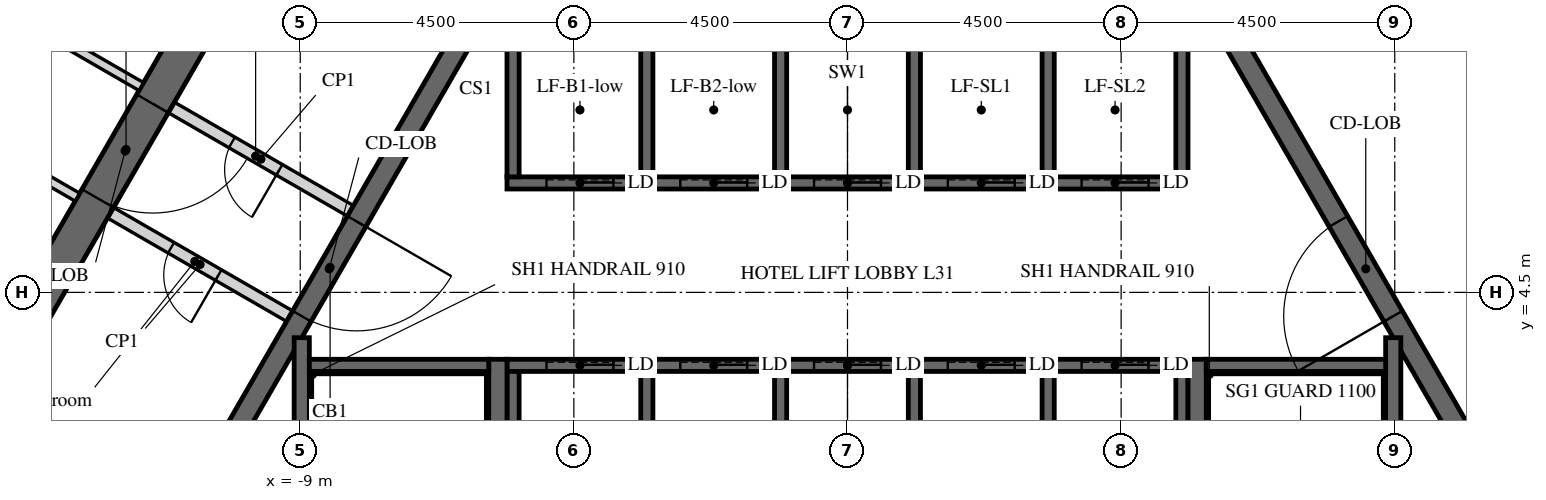
"""IFC4 building model, lengths in metres.
Left out: names, types, materials, properties, quantities, classifications, styles, units other than length and angle.
Written with IfcOpenShell. Run it as: python <this file> out.ifc"""

import sys

from ifc_helpers import new_model, si_unit, direction, frame, frame_2d, origin, place, context, subcontext, project, spatial, polyline, rectangle, outline, extrude, element, fill, save


model = new_model("IFC4")
c1 = context("Model", 3, precision=1e-05, world=origin(), true_north=direction((0.0, 1.0)))
c2 = subcontext(c1, "Body", "Model", "MODEL_VIEW")
j1 = project(units=[si_unit("LENGTHUNIT", "METRE"), si_unit("PLANEANGLEUNIT", "RADIAN")], contexts=[c1])
p1 = place(None, origin())
s1 = spatial("IfcSite", under=j1, at=p1, CompositionType="ELEMENT")
p2 = place(p1, origin())
s2 = spatial("IfcBuilding", under=s1, at=p2, CompositionType="ELEMENT")
p3 = place(p2, frame((0.0, 0.0, 135.0)))
s3 = spatial("IfcBuildingStorey", under=s2, at=p3, CompositionType="ELEMENT", Elevation=135.0)
p4 = place(p3, frame((-7.91, 13.7, -0.15), z_axis=(0.0, 0.0, 1.0), x_axis=(-0.499999880136, -0.866025472988, 0.0)))
e1 = element("IfcWall", 1, at=p4, inside=s3, PredefinedType="SHEAR", context=c2, shape_type="SweptSolid", body=[
    extrude(outline(polyline([(-0.173, -0.3), (15.993, -0.3), (15.646, 0.3), (0.173, 0.3), (-0.173, -0.3)])), origin(), (0.0, 0.0, 1.0), 3.9),
])
p5 = place(p4, frame((7.039, 0.0, 0.15)))
e2 = element("IfcOpeningElement", 2, at=p5, cuts=e1, PredefinedType="OPENING", context=c2, shape_type="SweptSolid", body=[
    extrude(rectangle(XDim=1.8, YDim=2.4, at=frame_2d((0.9, 1.2))), frame((0.0, 0.31, 0.0), z_axis=(0.0, -1.0, 0.0), x_axis=(1.0, 0.0, 0.0)), (0.0, 0.0, 1.0), 0.62),
])
p6 = place(p3, frame((15.819, 0.0, -0.15), z_axis=(0.0, 0.0, 1.0), x_axis=(-0.499999880136, 0.866025472988, 0.0)))
e3 = element("IfcWall", 3, at=p6, inside=s3, PredefinedType="SHEAR", context=c2, shape_type="SweptSolid", body=[
    extrude(outline(polyline([(-0.173, -0.3), (15.993, -0.3), (15.646, 0.3), (0.173, 0.3), (-0.173, -0.3)])), origin(), (0.0, 0.0, 1.0), 3.9),
])
p7 = place(p6, frame((6.981, 0.0, 0.15)))
e4 = element("IfcOpeningElement", 4, at=p7, cuts=e3, PredefinedType="OPENING", context=c2, shape_type="SweptSolid", body=[
    extrude(rectangle(XDim=1.8, YDim=2.4, at=frame_2d((0.9, 1.2))), frame((0.0, 0.31, 0.0), z_axis=(0.0, -1.0, 0.0), x_axis=(1.0, 0.0, 0.0)), (0.0, 0.0, 1.0), 0.62),
])
p8 = place(p3, frame((-5.673, 9.825, -0.15), z_axis=(0.0, 0.0, 1.0), x_axis=(-0.499995046907, -0.866028263435, 0.0)))
e5 = element("IfcWall", 5, at=p8, inside=s3, PredefinedType="SHEAR", context=c2, shape_type="SweptSolid", body=[
    extrude(outline(polyline([(-0.101, -0.175), (11.446, -0.175), (11.244, 0.175), (0.101, 0.175), (-0.101, -0.175)])), origin(), (0.0, 0.0, 1.0), 3.9),
])
p9 = place(p8, frame((4.801, 0.0, 0.15)))
e6 = element("IfcOpeningElement", 6, at=p9, cuts=e5, PredefinedType="OPENING", context=c2, shape_type="SweptSolid", body=[
    extrude(rectangle(XDim=1.8, YDim=2.4, at=frame_2d((0.9, 1.2))), frame((0.0, 0.185, 0.0), z_axis=(0.0, -1.0, 0.0), x_axis=(1.0, 0.0, 0.0)), (0.0, 0.0, 1.0), 0.37),
])
p10 = place(p3, frame((11.345, 0.0, -0.15), z_axis=(0.0, 0.0, 1.0), x_axis=(-0.499995046907, 0.866028263435, 0.0)))
e7 = element("IfcWall", 7, at=p10, inside=s3, PredefinedType="SHEAR", context=c2, shape_type="SweptSolid", body=[
    extrude(outline(polyline([(-0.101, -0.175), (11.446, -0.175), (11.244, 0.175), (0.101, 0.175), (-0.101, -0.175)])), origin(), (0.0, 0.0, 1.0), 3.9),
])
p11 = place(p10, frame((4.744, 0.0, 0.15)))
e8 = element("IfcOpeningElement", 8, at=p11, cuts=e7, PredefinedType="OPENING", context=c2, shape_type="SweptSolid", body=[
    extrude(rectangle(XDim=1.8, YDim=2.4, at=frame_2d((0.9, 1.2))), frame((0.0, 0.185, 0.0), z_axis=(0.0, -1.0, 0.0), x_axis=(1.0, 0.0, 0.0)), (0.0, 0.0, 1.0), 0.37),
])
p12 = place(p3, frame((-5.6, 6.3, -0.25), z_axis=(0.0, 0.0, 1.0), x_axis=(1.0, 0.0, 0.0)))
e9 = element("IfcWall", 9, at=p12, inside=s3, PredefinedType="SHEAR", context=c2, shape_type="SweptSolid", body=[
    extrude(rectangle(XDim=11.2, YDim=0.2, at=frame_2d((5.6, 0.0))), origin(), (0.0, 0.0, 1.0), 3.9),
])
p13 = place(p12, frame((0.65, 0.0, 0.25)))
e10 = element("IfcOpeningElement", 10, at=p13, cuts=e9, PredefinedType="OPENING", context=c2, shape_type="SweptSolid", body=[
    extrude(rectangle(XDim=1.1, YDim=2.1, at=frame_2d((0.55, 1.05))), frame((0.0, 0.11, 0.0), z_axis=(0.0, -1.0, 0.0), x_axis=(1.0, 0.0, 0.0)), (0.0, 0.0, 1.0), 0.22),
])
p14 = place(p12, frame((2.85, 0.0, 0.25)))
e11 = element("IfcOpeningElement", 11, at=p14, cuts=e9, PredefinedType="OPENING", context=c2, shape_type="SweptSolid", body=[
    extrude(rectangle(XDim=1.1, YDim=2.1, at=frame_2d((0.55, 1.05))), frame((0.0, 0.11, 0.0), z_axis=(0.0, -1.0, 0.0), x_axis=(1.0, 0.0, 0.0)), (0.0, 0.0, 1.0), 0.22),
])
p15 = place(p12, frame((5.05, 0.0, 0.25)))
e12 = element("IfcOpeningElement", 12, at=p15, cuts=e9, PredefinedType="OPENING", context=c2, shape_type="SweptSolid", body=[
    extrude(rectangle(XDim=1.1, YDim=2.1, at=frame_2d((0.55, 1.05))), frame((0.0, 0.11, 0.0), z_axis=(0.0, -1.0, 0.0), x_axis=(1.0, 0.0, 0.0)), (0.0, 0.0, 1.0), 0.22),
])
p16 = place(p12, frame((7.25, 0.0, 0.25)))
e13 = element("IfcOpeningElement", 13, at=p16, cuts=e9, PredefinedType="OPENING", context=c2, shape_type="SweptSolid", body=[
    extrude(rectangle(XDim=1.1, YDim=2.1, at=frame_2d((0.55, 1.05))), frame((0.0, 0.11, 0.0), z_axis=(0.0, -1.0, 0.0), x_axis=(1.0, 0.0, 0.0)), (0.0, 0.0, 1.0), 0.22),
])
p17 = place(p12, frame((9.45, 0.0, 0.25)))
e14 = element("IfcOpeningElement", 14, at=p17, cuts=e9, PredefinedType="OPENING", context=c2, shape_type="SweptSolid", body=[
    extrude(rectangle(XDim=1.1, YDim=2.1, at=frame_2d((0.55, 1.05))), frame((0.0, 0.11, 0.0), z_axis=(0.0, -1.0, 0.0), x_axis=(1.0, 0.0, 0.0)), (0.0, 0.0, 1.0), 0.22),
])
for number, where, z_axis, x_axis in (
    (15, (-5.5, 6.4, -0.25), (0.0, 0.0, 1.0), (0.0, 1.0, 0.0)),
    (16, (-3.3, 6.4, -0.25), (0.0, 0.0, 1.0), (0.0, 1.0, 0.0)),
    (17, (-1.1, 6.4, -0.25), (0.0, 0.0, 1.0), (0.0, 1.0, 0.0)),
    (18, (1.1, 6.4, -0.25), (0.0, 0.0, 1.0), (0.0, 1.0, 0.0)),
    (19, (3.3, 6.4, -0.25), (0.0, 0.0, 1.0), (0.0, 1.0, 0.0)),
    (20, (5.5, 6.4, -0.25), (0.0, 0.0, 1.0), (0.0, 1.0, 0.0)),
):
    element("IfcWall", number, at=place(p3, frame(where, z_axis=z_axis, x_axis=x_axis)), inside=s3, PredefinedType="SHEAR", context=c2, shape_type="SweptSolid", body=[
        extrude(rectangle(XDim=2.9, YDim=0.2, at=frame_2d((1.45, 0.0))), origin(), (0.0, 0.0, 1.0), 3.9),
    ])
p18 = place(p3, frame((-5.6, 3.3, -0.25), z_axis=(0.0, 0.0, 1.0), x_axis=(1.0, 0.0, 0.0)))
e21 = element("IfcWall", 21, at=p18, inside=s3, PredefinedType="SHEAR", context=c2, shape_type="SweptSolid", body=[
    extrude(rectangle(XDim=11.2, YDim=0.2, at=frame_2d((5.6, 0.0))), origin(), (0.0, 0.0, 1.0), 3.9),
])
p19 = place(p18, frame((0.65, 0.0, 0.25)))
e22 = element("IfcOpeningElement", 22, at=p19, cuts=e21, PredefinedType="OPENING", context=c2, shape_type="SweptSolid", body=[
    extrude(rectangle(XDim=1.1, YDim=2.1, at=frame_2d((0.55, 1.05))), frame((0.0, 0.11, 0.0), z_axis=(0.0, -1.0, 0.0), x_axis=(1.0, 0.0, 0.0)), (0.0, 0.0, 1.0), 0.22),
])
p20 = place(p18, frame((2.85, 0.0, 0.25)))
e23 = element("IfcOpeningElement", 23, at=p20, cuts=e21, PredefinedType="OPENING", context=c2, shape_type="SweptSolid", body=[
    extrude(rectangle(XDim=1.1, YDim=2.1, at=frame_2d((0.55, 1.05))), frame((0.0, 0.11, 0.0), z_axis=(0.0, -1.0, 0.0), x_axis=(1.0, 0.0, 0.0)), (0.0, 0.0, 1.0), 0.22),
])
p21 = place(p18, frame((5.05, 0.0, 0.25)))
e24 = element("IfcOpeningElement", 24, at=p21, cuts=e21, PredefinedType="OPENING", context=c2, shape_type="SweptSolid", body=[
    extrude(rectangle(XDim=1.1, YDim=2.1, at=frame_2d((0.55, 1.05))), frame((0.0, 0.11, 0.0), z_axis=(0.0, -1.0, 0.0), x_axis=(1.0, 0.0, 0.0)), (0.0, 0.0, 1.0), 0.22),
])
p22 = place(p18, frame((7.25, 0.0, 0.25)))
e25 = element("IfcOpeningElement", 25, at=p22, cuts=e21, PredefinedType="OPENING", context=c2, shape_type="SweptSolid", body=[
    extrude(rectangle(XDim=1.1, YDim=2.1, at=frame_2d((0.55, 1.05))), frame((0.0, 0.11, 0.0), z_axis=(0.0, -1.0, 0.0), x_axis=(1.0, 0.0, 0.0)), (0.0, 0.0, 1.0), 0.22),
])
p23 = place(p18, frame((9.45, 0.0, 0.25)))
e26 = element("IfcOpeningElement", 26, at=p23, cuts=e21, PredefinedType="OPENING", context=c2, shape_type="SweptSolid", body=[
    extrude(rectangle(XDim=1.1, YDim=2.1, at=frame_2d((0.55, 1.05))), frame((0.0, 0.11, 0.0), z_axis=(0.0, -1.0, 0.0), x_axis=(1.0, 0.0, 0.0)), (0.0, 0.0, 1.0), 0.22),
])
for number, where, z_axis, x_axis in (
    (27, (-5.5, 0.1, -0.25), (0.0, 0.0, 1.0), (0.0, 1.0, 0.0)),
    (28, (-3.3, 0.1, -0.25), (0.0, 0.0, 1.0), (0.0, 1.0, 0.0)),
    (29, (-1.1, 0.1, -0.25), (0.0, 0.0, 1.0), (0.0, 1.0, 0.0)),
    (30, (1.1, 0.1, -0.25), (0.0, 0.0, 1.0), (0.0, 1.0, 0.0)),
    (31, (3.3, 0.1, -0.25), (0.0, 0.0, 1.0), (0.0, 1.0, 0.0)),
    (32, (5.5, 0.1, -0.25), (0.0, 0.0, 1.0), (0.0, 1.0, 0.0)),
):
    element("IfcWall", number, at=place(p3, frame(where, z_axis=z_axis, x_axis=x_axis)), inside=s3, PredefinedType="SHEAR", context=c2, shape_type="SweptSolid", body=[
        extrude(rectangle(XDim=3.1, YDim=0.2, at=frame_2d((1.55, 0.0))), origin(), (0.0, 0.0, 1.0), 3.9),
    ])
p24 = place(p3, frame((-9.175, 4.109, 0.0), z_axis=(0.0, 0.0, 1.0), x_axis=(-0.865989465428, 0.500062241894, 0.0)))
e33 = element("IfcWall", 33, at=p24, inside=s3, PredefinedType="PARTITIONING", context=c2, shape_type="SweptSolid", body=[
    extrude(rectangle(XDim=3.4, YDim=0.2, at=frame_2d((1.7, 0.0))), origin(), (0.0, 0.0, 1.0), 3.65),
])
p25 = place(p24, frame((1.351, 0.0, 0.0)))
e34 = element("IfcOpeningElement", 34, at=p25, cuts=e33, PredefinedType="OPENING", context=c2, shape_type="SweptSolid", body=[
    extrude(rectangle(XDim=0.9, YDim=2.1, at=frame_2d((0.45, 1.05))), frame((0.0, 0.11, 0.0), z_axis=(0.0, -1.0, 0.0), x_axis=(1.0, 0.0, 0.0)), (0.0, 0.0, 1.0), 0.22),
])
p26 = place(p3, frame((-8.175, 5.841, 0.0), z_axis=(0.0, 0.0, 1.0), x_axis=(-0.866020560687, 0.500008388397, 0.0)))
e35 = element("IfcWall", 35, at=p26, inside=s3, PredefinedType="PARTITIONING", context=c2, shape_type="SweptSolid", body=[
    extrude(rectangle(XDim=3.4, YDim=0.2, at=frame_2d((1.7, 0.0))), origin(), (0.0, 0.0, 1.0), 3.65),
])
p27 = place(p26, frame((1.35, 0.0, 0.0)))
e36 = element("IfcOpeningElement", 36, at=p27, cuts=e35, PredefinedType="OPENING", context=c2, shape_type="SweptSolid", body=[
    extrude(rectangle(XDim=0.9, YDim=2.1, at=frame_2d((0.45, 1.05))), frame((0.0, 0.11, 0.0), z_axis=(0.0, -1.0, 0.0), x_axis=(1.0, 0.0, 0.0)), (0.0, 0.0, 1.0), 0.22),
])
p28 = place(p3, frame((5.75, -3.4, -0.25), z_axis=(0.0, 0.0, 1.0), x_axis=(0.0, 1.0, 0.0)))
e37 = element("IfcWall", 37, at=p28, inside=s3, PredefinedType="SHEAR", context=c2, shape_type="SweptSolid", body=[
    extrude(rectangle(XDim=6.8, YDim=0.3, at=frame_2d((3.4, 0.0))), origin(), (0.0, 0.0, 1.0), 3.9),
])
p29 = place(p3, frame((8.975, -3.755, -0.25), z_axis=(0.0, 0.0, 1.0), x_axis=(0.0, 1.0, 0.0)))
e38 = element("IfcWall", 38, at=p29, inside=s3, PredefinedType="SHEAR", context=c2, shape_type="SweptSolid", body=[
    extrude(rectangle(XDim=7.51, YDim=0.25, at=frame_2d((3.755, 0.0))), origin(), (0.0, 0.0, 1.0), 3.9),
])
p30 = place(p3, frame((5.9, 3.3, -0.25), z_axis=(0.0, 0.0, 1.0), x_axis=(1.0, 0.0, 0.0)))
e39 = element("IfcWall", 39, at=p30, inside=s3, PredefinedType="SHEAR", context=c2, shape_type="SweptSolid", body=[
    extrude(rectangle(XDim=2.95, YDim=0.2, at=frame_2d((1.475, 0.0))), origin(), (0.0, 0.0, 1.0), 3.9),
])
p31 = place(p3, frame((-5.75, -3.4, -0.25), z_axis=(0.0, 0.0, 1.0), x_axis=(0.0, 1.0, 0.0)))
e40 = element("IfcWall", 40, at=p31, inside=s3, PredefinedType="SHEAR", context=c2, shape_type="SweptSolid", body=[
    extrude(rectangle(XDim=6.8, YDim=0.3, at=frame_2d((3.4, 0.0))), origin(), (0.0, 0.0, 1.0), 3.9),
])
p32 = place(p3, frame((-8.975, -3.755, -0.25), z_axis=(0.0, 0.0, 1.0), x_axis=(0.0, 1.0, 0.0)))
e41 = element("IfcWall", 41, at=p32, inside=s3, PredefinedType="SHEAR", context=c2, shape_type="SweptSolid", body=[
    extrude(rectangle(XDim=7.51, YDim=0.25, at=frame_2d((3.755, 0.0))), origin(), (0.0, 0.0, 1.0), 3.9),
])
p33 = place(p3, frame((-8.85, 3.3, -0.25), z_axis=(0.0, 0.0, 1.0), x_axis=(1.0, 0.0, 0.0)))
e42 = element("IfcWall", 42, at=p33, inside=s3, PredefinedType="SHEAR", context=c2, shape_type="SweptSolid", body=[
    extrude(rectangle(XDim=2.95, YDim=0.2, at=frame_2d((1.475, 0.0))), origin(), (0.0, 0.0, 1.0), 3.9),
])
p34 = place(p3, frame((-11.614, 7.884, 0.0), z_axis=(0.0, 0.0, 1.0), x_axis=(-0.866017375886, 0.50001390447, 0.0)))
e43 = element("IfcWall", 43, at=p34, inside=s3, PredefinedType="PARTITIONING", context=c2, shape_type="SweptSolid", body=[
    extrude(rectangle(XDim=5.97, YDim=0.15, at=frame_2d((2.985, 0.0))), origin(), (0.0, 0.0, 1.0), 2.838),
])
p35 = place(p3, frame((-17.642, 8.94, 0.0), z_axis=(0.0, 0.0, 1.0), x_axis=(0.866017948234, -0.500012913169, 0.0)))
e44 = element("IfcWall", 44, at=p35, inside=s3, PredefinedType="PARTITIONING", context=c2, shape_type="SweptSolid", body=[
    extrude(rectangle(XDim=5.748, YDim=0.15, at=frame_2d((2.874, 0.0))), origin(), (0.0, 0.0, 1.0), 2.838),
])
p36 = place(p5, origin())
e45 = element("IfcDoor", 45, at=p36, inside=s3, OperationType="DOUBLE_DOOR_SINGLE_SWING", PredefinedType="DOOR", context=c2, shape_type="SweptSolid", body=[
    extrude(rectangle(XDim=1.8, YDim=2.4, at=frame_2d((0.9, 1.2))), frame((0.0, 0.025, 0.0), z_axis=(0.0, -1.0, 0.0), x_axis=(1.0, 0.0, 0.0)), (0.0, 0.0, 1.0), 0.05),
])
fill(e2, e45)
p37 = place(p9, origin())
e46 = element("IfcDoor", 46, at=p37, inside=s3, OperationType="DOUBLE_DOOR_SINGLE_SWING", PredefinedType="DOOR", context=c2, shape_type="SweptSolid", body=[
    extrude(rectangle(XDim=1.8, YDim=2.4, at=frame_2d((0.9, 1.2))), frame((0.0, 0.025, 0.0), z_axis=(0.0, -1.0, 0.0), x_axis=(1.0, 0.0, 0.0)), (0.0, 0.0, 1.0), 0.05),
])
fill(e6, e46)
p38 = place(p11, origin())
e47 = element("IfcDoor", 47, at=p38, inside=s3, OperationType="DOUBLE_DOOR_SINGLE_SWING", PredefinedType="DOOR", context=c2, shape_type="SweptSolid", body=[
    extrude(rectangle(XDim=1.8, YDim=2.4, at=frame_2d((0.9, 1.2))), frame((0.0, 0.025, 0.0), z_axis=(0.0, -1.0, 0.0), x_axis=(1.0, 0.0, 0.0)), (0.0, 0.0, 1.0), 0.05),
])
fill(e8, e47)
p39 = place(p25, origin())
e48 = element("IfcDoor", 48, at=p39, inside=s3, OperationType="SINGLE_SWING_LEFT", PredefinedType="DOOR", context=c2, shape_type="SweptSolid", body=[
    extrude(rectangle(XDim=0.9, YDim=2.1, at=frame_2d((0.45, 1.05))), frame((0.0, 0.025, 0.0), z_axis=(0.0, -1.0, 0.0), x_axis=(1.0, 0.0, 0.0)), (0.0, 0.0, 1.0), 0.05),
])
fill(e34, e48)
p40 = place(p27, origin())
e49 = element("IfcDoor", 49, at=p40, inside=s3, OperationType="SINGLE_SWING_LEFT", PredefinedType="DOOR", context=c2, shape_type="SweptSolid", body=[
    extrude(rectangle(XDim=0.9, YDim=2.1, at=frame_2d((0.45, 1.05))), frame((0.0, 0.025, 0.0), z_axis=(0.0, -1.0, 0.0), x_axis=(1.0, 0.0, 0.0)), (0.0, 0.0, 1.0), 0.05),
])
fill(e36, e49)
p41 = place(p13, origin())
e50 = element("IfcDoor", 50, at=p41, inside=s3, OperationType="SLIDING_TO_LEFT", PredefinedType="DOOR", context=c2, shape_type="SweptSolid", body=[
    extrude(rectangle(XDim=1.1, YDim=2.1, at=frame_2d((0.55, 1.05))), frame((0.0, 0.025, 0.0), z_axis=(0.0, -1.0, 0.0), x_axis=(1.0, 0.0, 0.0)), (0.0, 0.0, 1.0), 0.05),
])
fill(e10, e50)
p42 = place(p14, origin())
e51 = element("IfcDoor", 51, at=p42, inside=s3, OperationType="SLIDING_TO_LEFT", PredefinedType="DOOR", context=c2, shape_type="SweptSolid", body=[
    extrude(rectangle(XDim=1.1, YDim=2.1, at=frame_2d((0.55, 1.05))), frame((0.0, 0.025, 0.0), z_axis=(0.0, -1.0, 0.0), x_axis=(1.0, 0.0, 0.0)), (0.0, 0.0, 1.0), 0.05),
])
fill(e11, e51)
p43 = place(p15, origin())
e52 = element("IfcDoor", 52, at=p43, inside=s3, OperationType="SLIDING_TO_LEFT", PredefinedType="DOOR", context=c2, shape_type="SweptSolid", body=[
    extrude(rectangle(XDim=1.1, YDim=2.1, at=frame_2d((0.55, 1.05))), frame((0.0, 0.025, 0.0), z_axis=(0.0, -1.0, 0.0), x_axis=(1.0, 0.0, 0.0)), (0.0, 0.0, 1.0), 0.05),
])
fill(e12, e52)
p44 = place(p16, origin())
e53 = element("IfcDoor", 53, at=p44, inside=s3, OperationType="SLIDING_TO_LEFT", PredefinedType="DOOR", context=c2, shape_type="SweptSolid", body=[
    extrude(rectangle(XDim=1.1, YDim=2.1, at=frame_2d((0.55, 1.05))), frame((0.0, 0.025, 0.0), z_axis=(0.0, -1.0, 0.0), x_axis=(1.0, 0.0, 0.0)), (0.0, 0.0, 1.0), 0.05),
])
fill(e13, e53)
p45 = place(p17, origin())
e54 = element("IfcDoor", 54, at=p45, inside=s3, OperationType="SLIDING_TO_LEFT", PredefinedType="DOOR", context=c2, shape_type="SweptSolid", body=[
    extrude(rectangle(XDim=1.1, YDim=2.1, at=frame_2d((0.55, 1.05))), frame((0.0, 0.025, 0.0), z_axis=(0.0, -1.0, 0.0), x_axis=(1.0, 0.0, 0.0)), (0.0, 0.0, 1.0), 0.05),
])
fill(e14, e54)
p46 = place(p19, origin())
e55 = element("IfcDoor", 55, at=p46, inside=s3, OperationType="SLIDING_TO_LEFT", PredefinedType="DOOR", context=c2, shape_type="SweptSolid", body=[
    extrude(rectangle(XDim=1.1, YDim=2.1, at=frame_2d((0.55, 1.05))), frame((0.0, 0.025, 0.0), z_axis=(0.0, -1.0, 0.0), x_axis=(1.0, 0.0, 0.0)), (0.0, 0.0, 1.0), 0.05),
])
fill(e22, e55)
p47 = place(p20, origin())
e56 = element("IfcDoor", 56, at=p47, inside=s3, OperationType="SLIDING_TO_LEFT", PredefinedType="DOOR", context=c2, shape_type="SweptSolid", body=[
    extrude(rectangle(XDim=1.1, YDim=2.1, at=frame_2d((0.55, 1.05))), frame((0.0, 0.025, 0.0), z_axis=(0.0, -1.0, 0.0), x_axis=(1.0, 0.0, 0.0)), (0.0, 0.0, 1.0), 0.05),
])
fill(e23, e56)
p48 = place(p21, origin())
e57 = element("IfcDoor", 57, at=p48, inside=s3, OperationType="SLIDING_TO_LEFT", PredefinedType="DOOR", context=c2, shape_type="SweptSolid", body=[
    extrude(rectangle(XDim=1.1, YDim=2.1, at=frame_2d((0.55, 1.05))), frame((0.0, 0.025, 0.0), z_axis=(0.0, -1.0, 0.0), x_axis=(1.0, 0.0, 0.0)), (0.0, 0.0, 1.0), 0.05),
])
fill(e24, e57)
p49 = place(p22, origin())
e58 = element("IfcDoor", 58, at=p49, inside=s3, OperationType="SLIDING_TO_LEFT", PredefinedType="DOOR", context=c2, shape_type="SweptSolid", body=[
    extrude(rectangle(XDim=1.1, YDim=2.1, at=frame_2d((0.55, 1.05))), frame((0.0, 0.025, 0.0), z_axis=(0.0, -1.0, 0.0), x_axis=(1.0, 0.0, 0.0)), (0.0, 0.0, 1.0), 0.05),
])
fill(e25, e58)
p50 = place(p23, origin())
e59 = element("IfcDoor", 59, at=p50, inside=s3, OperationType="SLIDING_TO_LEFT", PredefinedType="DOOR", context=c2, shape_type="SweptSolid", body=[
    extrude(rectangle(XDim=1.1, YDim=2.1, at=frame_2d((0.55, 1.05))), frame((0.0, 0.025, 0.0), z_axis=(0.0, -1.0, 0.0), x_axis=(1.0, 0.0, 0.0)), (0.0, 0.0, 1.0), 0.05),
])
fill(e26, e59)
save(model, sys.argv[1])
